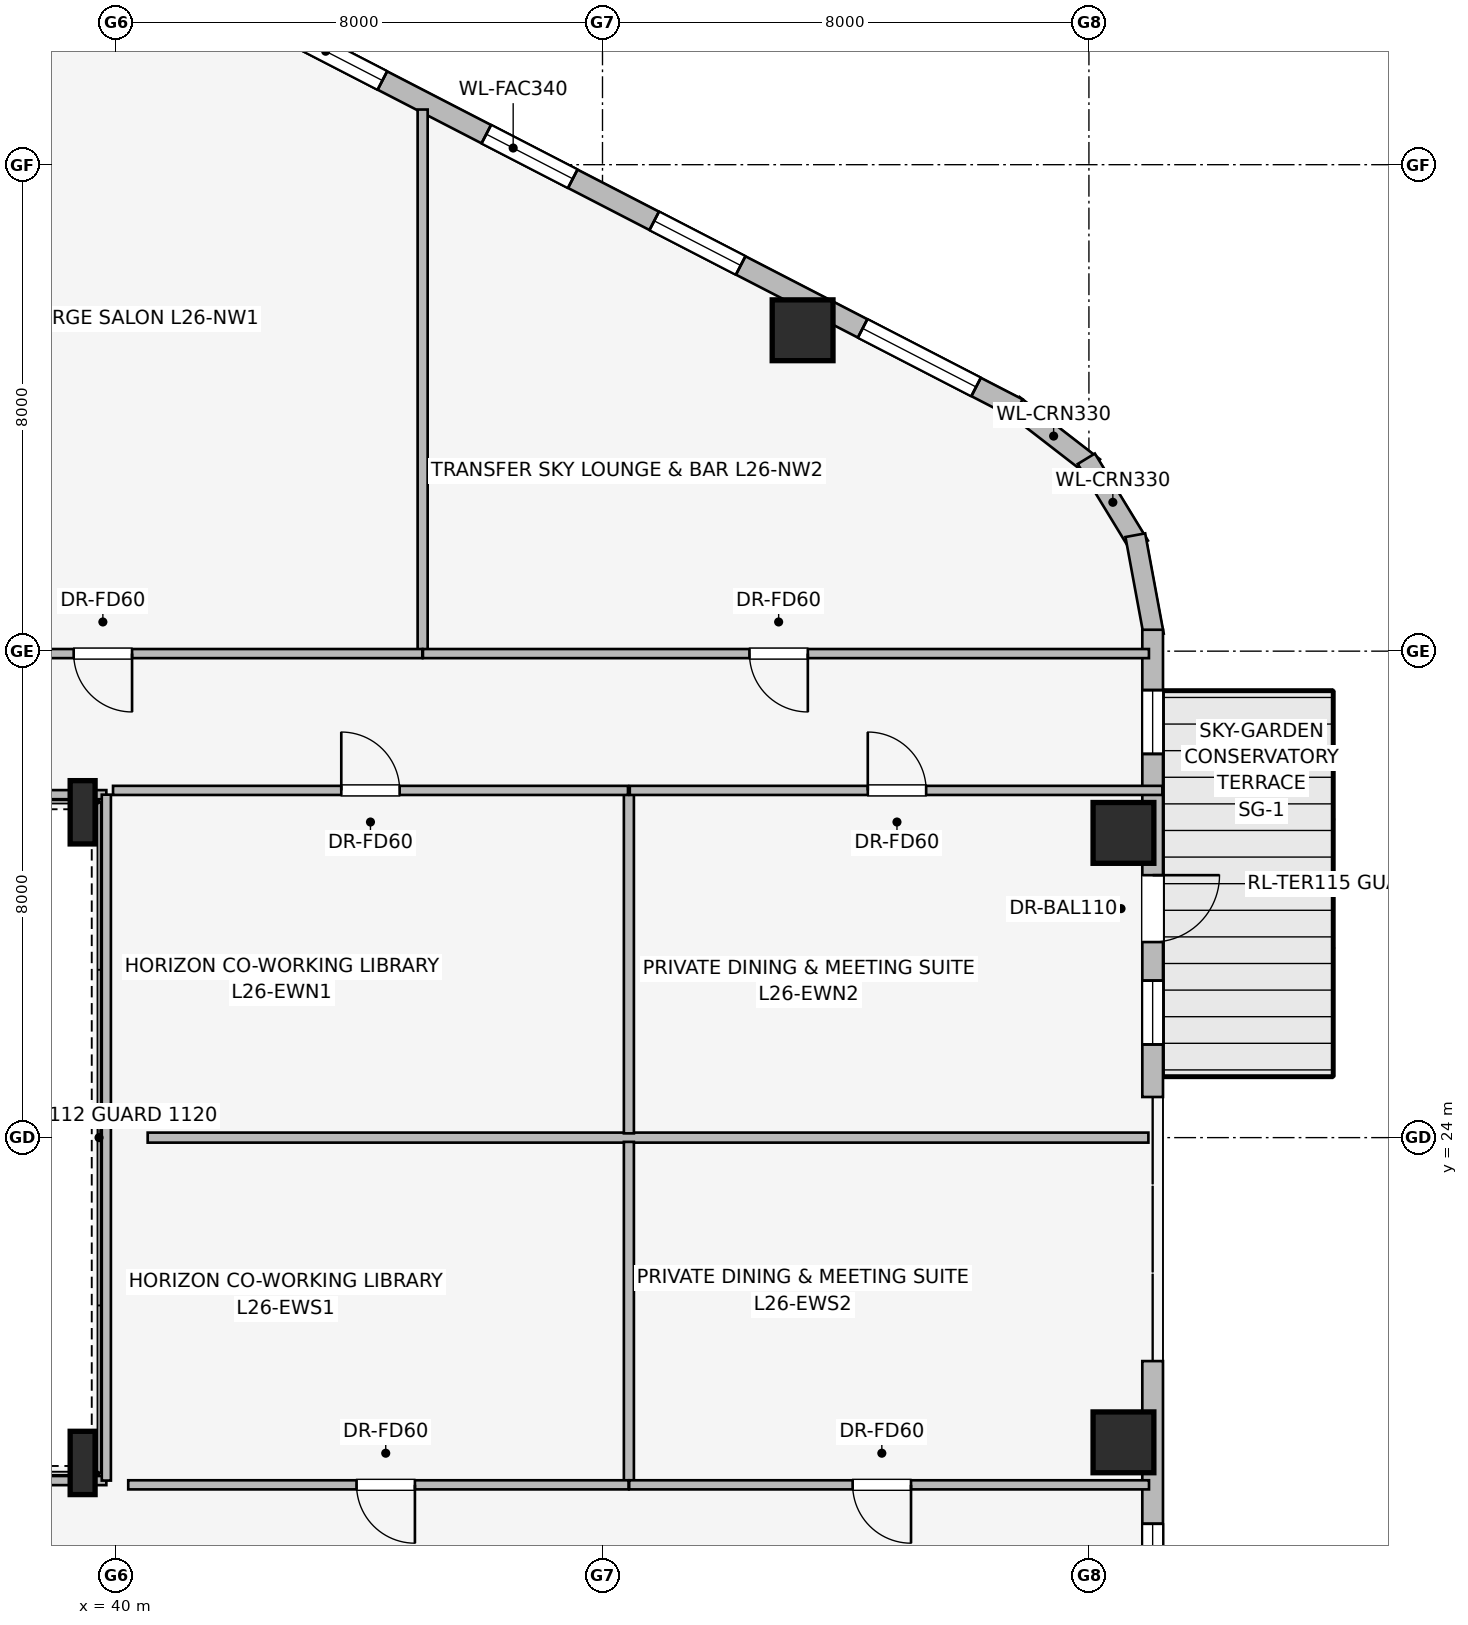
"""IFC4 building model, lengths in metres.
Left out: names, types, materials, properties, quantities, classifications, styles, units other than length and angle.
Written with IfcOpenShell. Run it as: python <this file> out.ifc"""

import sys

from ifc_helpers import new_model, si_unit, direction, frame, frame_2d, origin, origin_2d, place, context, subcontext, project, spatial, rectangle, i_section, extrude, element, fill, save


model = new_model("IFC4")
c1 = context("Model", 3, precision=1e-05, world=origin(), true_north=direction((0.0, 1.0)))
c2 = subcontext(c1, "Body", "Model", "MODEL_VIEW")
j1 = project(units=[si_unit("LENGTHUNIT", "METRE"), si_unit("PLANEANGLEUNIT", "RADIAN")], contexts=[c1])
p1 = place(None, origin())
s1 = spatial("IfcSite", under=j1, at=p1, CompositionType="ELEMENT")
p2 = place(p1, origin())
s2 = spatial("IfcBuilding", under=s1, at=p2, CompositionType="ELEMENT")
p3 = place(p2, frame((0.0, 0.0, 101.55)))
s3 = spatial("IfcBuildingStorey", under=s2, at=p3, CompositionType="ELEMENT", Elevation=101.55)
for number, where, z_axis, x_axis in (
    (1, (51.291, 37.277, 0.0), (0.0, 0.0, 1.0), (1.0, 0.0, 0.0)),
    (2, (56.568, 18.989, 0.0), (0.0, 0.0, 1.0), (1.0, 0.0, 0.0)),
    (3, (56.568, 29.011, 0.0), (0.0, 0.0, 1.0), (1.0, 0.0, 0.0)),
):
    element("IfcColumn", number, at=place(p3, frame(where, z_axis=z_axis, x_axis=x_axis)), inside=s3, PredefinedType="COLUMN", context=c2, shape_type="SweptSolid", body=[
        extrude(rectangle(XDim=1.0, YDim=1.0, at=origin_2d()), origin(), (0.0, 0.0, 1.0), 3.45),
    ])
for number, where, z_axis, x_axis in (
    (4, (39.45, 18.65, 0.0), (0.0, 0.0, 1.0), (1.0, 0.0, 0.0)),
    (5, (39.45, 29.35, 0.0), (0.0, 0.0, 1.0), (1.0, 0.0, 0.0)),
):
    element("IfcColumn", number, at=place(p3, frame(where, z_axis=z_axis, x_axis=x_axis)), inside=s3, PredefinedType="COLUMN", context=c2, shape_type="SweptSolid", body=[
        extrude(i_section(OverallWidth=0.41, OverallDepth=1.041, WebThickness=0.031, FlangeThickness=0.056, at=origin_2d()), origin(), (0.0, 0.0, 1.0), 3.45),
    ])
p4 = place(p3, frame((54.757, 36.05, 0.0), z_axis=(0.0, 0.0, 1.0), x_axis=(0.790621329885, -0.612305408053, 0.0)))
e6 = element("IfcWall", 6, at=p4, inside=s3, PredefinedType="STANDARD", context=c2, shape_type="SweptSolid", body=[
    extrude(rectangle(XDim=1.676, YDim=0.33, at=frame_2d((0.838, 0.0))), origin(), (0.0, 0.0, 1.0), 3.19),
])
p5 = place(p3, frame((55.957, 35.164, 0.0), z_axis=(0.0, 0.0, 1.0), x_axis=(0.520519429557, -0.853849824883, 0.0)))
e7 = element("IfcWall", 7, at=p5, inside=s3, PredefinedType="STANDARD", context=c2, shape_type="SweptSolid", body=[
    extrude(rectangle(XDim=1.677, YDim=0.33, at=frame_2d((0.839, 0.0))), origin(), (0.0, 0.0, 1.0), 3.19),
])
p6 = place(p3, frame((56.763, 33.907, 0.0), z_axis=(0.0, 0.0, 1.0), x_axis=(0.181984991895, -0.983301308209, 0.0)))
e8 = element("IfcWall", 8, at=p6, inside=s3, PredefinedType="STANDARD", context=c2, shape_type="SweptSolid", body=[
    extrude(rectangle(XDim=1.677, YDim=0.33, at=frame_2d((0.838, 0.0))), origin(), (0.0, 0.0, 1.0), 3.19),
])
p7 = place(p3, frame((38.231, 44.558, 0.0), z_axis=(0.0, 0.0, 1.0), x_axis=(0.888613612362, -0.458656568606, 0.0)))
e9 = element("IfcWall", 9, at=p7, inside=s3, PredefinedType="STANDARD", context=c2, shape_type="SweptSolid", body=[
    extrude(rectangle(XDim=18.681, YDim=0.34, at=frame_2d((9.34, 0.0))), origin(), (0.0, 0.0, 1.0), 3.19),
])
p8 = place(p7, frame((1.023, 0.0, 0.75)))
e10 = element("IfcOpeningElement", 10, at=p8, cuts=e9, PredefinedType="OPENING", context=c2, shape_type="SweptSolid", body=[
    extrude(rectangle(XDim=1.6, YDim=1.55, at=frame_2d((0.8, 0.775))), frame((0.0, 0.18, 0.0), z_axis=(0.0, -1.0, 0.0), x_axis=(1.0, 0.0, 0.0)), (0.0, 0.0, 1.0), 0.36),
])
p9 = place(p7, frame((4.82, 0.0, 0.75)))
e11 = element("IfcOpeningElement", 11, at=p9, cuts=e9, PredefinedType="OPENING", context=c2, shape_type="SweptSolid", body=[
    extrude(rectangle(XDim=2.1, YDim=1.5, at=frame_2d((1.05, 0.75))), frame((0.0, 0.18, 0.0), z_axis=(0.0, -1.0, 0.0), x_axis=(1.0, 0.0, 0.0)), (0.0, 0.0, 1.0), 0.36),
])
p10 = place(p7, frame((8.843, 0.0, 0.75)))
e12 = element("IfcOpeningElement", 12, at=p10, cuts=e9, PredefinedType="OPENING", context=c2, shape_type="SweptSolid", body=[
    extrude(rectangle(XDim=1.6, YDim=1.55, at=frame_2d((0.8, 0.775))), frame((0.0, 0.18, 0.0), z_axis=(0.0, -1.0, 0.0), x_axis=(1.0, 0.0, 0.0)), (0.0, 0.0, 1.0), 0.36),
])
p11 = place(p7, frame((11.951, 0.0, 0.75)))
e13 = element("IfcOpeningElement", 13, at=p11, cuts=e9, PredefinedType="OPENING", context=c2, shape_type="SweptSolid", body=[
    extrude(rectangle(XDim=1.6, YDim=1.55, at=frame_2d((0.8, 0.775))), frame((0.0, 0.18, 0.0), z_axis=(0.0, -1.0, 0.0), x_axis=(1.0, 0.0, 0.0)), (0.0, 0.0, 1.0), 0.36),
])
p12 = place(p7, frame((15.808, 0.0, 0.75)))
e14 = element("IfcOpeningElement", 14, at=p12, cuts=e9, PredefinedType="OPENING", context=c2, shape_type="SweptSolid", body=[
    extrude(rectangle(XDim=2.1, YDim=1.5, at=frame_2d((1.05, 0.75))), frame((0.0, 0.18, 0.0), z_axis=(0.0, -1.0, 0.0), x_axis=(1.0, 0.0, 0.0)), (0.0, 0.0, 1.0), 0.36),
])
p13 = place(p3, frame((57.048, 32.352, 0.0), z_axis=(0.0, 0.0, 1.0), x_axis=(0.0, -1.0, 0.0)))
e15 = element("IfcWall", 15, at=p13, inside=s3, PredefinedType="STANDARD", context=c2, shape_type="SweptSolid", body=[
    extrude(rectangle(XDim=7.684, YDim=0.34, at=frame_2d((3.842, 0.0))), origin(), (0.0, 0.0, 1.0), 3.19),
])
p14 = place(p13, frame((4.036, 0.0, 0.0)))
e16 = element("IfcOpeningElement", 16, at=p14, cuts=e15, PredefinedType="OPENING", context=c2, shape_type="SweptSolid", body=[
    extrude(rectangle(XDim=1.1, YDim=2.04, at=frame_2d((0.55, 1.02))), frame((0.0, 0.18, 0.0), z_axis=(0.0, -1.0, 0.0), x_axis=(1.0, 0.0, 0.0)), (0.0, 0.0, 1.0), 0.36),
])
p15 = place(p13, frame((0.992, 0.0, 0.75)))
e17 = element("IfcOpeningElement", 17, at=p15, cuts=e15, PredefinedType="OPENING", context=c2, shape_type="SweptSolid", body=[
    extrude(rectangle(XDim=1.05, YDim=1.4, at=frame_2d((0.525, 0.7))), frame((0.0, 0.18, 0.0), z_axis=(0.0, -1.0, 0.0), x_axis=(1.0, 0.0, 0.0)), (0.0, 0.0, 1.0), 0.36),
])
p16 = place(p13, frame((5.77, 0.0, 0.75)))
e18 = element("IfcOpeningElement", 18, at=p16, cuts=e15, PredefinedType="OPENING", context=c2, shape_type="SweptSolid", body=[
    extrude(rectangle(XDim=1.05, YDim=1.4, at=frame_2d((0.525, 0.7))), frame((0.0, 0.18, 0.0), z_axis=(0.0, -1.0, 0.0), x_axis=(1.0, 0.0, 0.0)), (0.0, 0.0, 1.0), 0.36),
])
p17 = place(p3, frame((57.048, 20.325, 0.0), z_axis=(0.0, 0.0, 1.0), x_axis=(0.0, -1.0, 0.0)))
e19 = element("IfcWall", 19, at=p17, inside=s3, PredefinedType="STANDARD", context=c2, shape_type="SweptSolid", body=[
    extrude(rectangle(XDim=4.677, YDim=0.34, at=frame_2d((2.338, 0.0))), origin(), (0.0, 0.0, 1.0), 3.19),
])
p18 = place(p17, frame((2.675, 0.0, 0.75)))
e20 = element("IfcOpeningElement", 20, at=p18, cuts=e19, PredefinedType="OPENING", context=c2, shape_type="SweptSolid", body=[
    extrude(rectangle(XDim=1.05, YDim=1.4, at=frame_2d((0.525, 0.7))), frame((0.0, 0.18, 0.0), z_axis=(0.0, -1.0, 0.0), x_axis=(1.0, 0.0, 0.0)), (0.0, 0.0, 1.0), 0.36),
])
p19 = place(p3, frame((27.55, 18.36, 0.0), z_axis=(0.0, 0.0, 1.0), x_axis=(1.0, 0.0, 0.0)))
e21 = element("IfcWall", 21, at=p19, inside=s3, PredefinedType="PARTITIONING", context=c2, shape_type="SweptSolid", body=[
    extrude(rectangle(XDim=12.29, YDim=0.15, at=frame_2d((6.145, 0.0))), origin(), (0.0, 0.0, 1.0), 2.331),
])
p20 = place(p3, frame((39.84, 29.64, 0.0), z_axis=(0.0, 0.0, 1.0), x_axis=(-1.0, 0.0, 0.0)))
e22 = element("IfcWall", 22, at=p20, inside=s3, PredefinedType="PARTITIONING", context=c2, shape_type="SweptSolid", body=[
    extrude(rectangle(XDim=12.2, YDim=0.15, at=frame_2d((6.1, 0.0))), origin(), (0.0, 0.0, 1.0), 2.331),
])
p21 = place(p3, frame((39.84, 18.36, 0.0), z_axis=(0.0, 0.0, 1.0), x_axis=(0.0, 1.0, 0.0)))
e23 = element("IfcWall", 23, at=p21, inside=s3, PredefinedType="PARTITIONING", context=c2, shape_type="SweptSolid", body=[
    extrude(rectangle(XDim=11.28, YDim=0.15, at=frame_2d((5.64, 0.0))), origin(), (0.0, 0.0, 1.0), 3.19),
])
p22 = place(p3, frame((45.042, 31.97, 0.0), z_axis=(0.0, 0.0, 1.0), x_axis=(0.0, 1.0, 0.0)))
e24 = element("IfcWall", 24, at=p22, inside=s3, PredefinedType="PARTITIONING", context=c2, shape_type="SweptSolid", body=[
    extrude(rectangle(XDim=8.937, YDim=0.165, at=frame_2d((4.469, 0.0))), origin(), (0.0, 0.0, 1.0), 3.19),
])
p23 = place(p3, frame((45.037, 31.96, 0.0), z_axis=(0.0, 0.0, 1.0), x_axis=(-1.0, 0.0, 0.0)))
e25 = element("IfcWall", 25, at=p23, inside=s3, PredefinedType="PARTITIONING", context=c2, shape_type="SweptSolid", body=[
    extrude(rectangle(XDim=10.747, YDim=0.15, at=frame_2d((5.374, 0.0))), origin(), (0.0, 0.0, 1.0), 3.19),
])
p24 = place(p23, frame((4.774, 0.0, 0.0)))
e26 = element("IfcOpeningElement", 26, at=p24, cuts=e25, PredefinedType="OPENING", context=c2, shape_type="SweptSolid", body=[
    extrude(rectangle(XDim=0.96, YDim=2.0, at=frame_2d((0.48, 1.0))), frame((0.0, 0.085, 0.0), z_axis=(0.0, -1.0, 0.0), x_axis=(1.0, 0.0, 0.0)), (0.0, 0.0, 1.0), 0.17),
])
p25 = place(p3, frame((56.987, 31.96, 0.0), z_axis=(0.0, 0.0, 1.0), x_axis=(-1.0, 0.0, 0.0)))
e27 = element("IfcWall", 27, at=p25, inside=s3, PredefinedType="PARTITIONING", context=c2, shape_type="SweptSolid", body=[
    extrude(rectangle(XDim=11.94, YDim=0.15, at=frame_2d((5.97, 0.0))), origin(), (0.0, 0.0, 1.0), 3.19),
])
p26 = place(p25, frame((5.61, 0.0, 0.0)))
e28 = element("IfcOpeningElement", 28, at=p26, cuts=e27, PredefinedType="OPENING", context=c2, shape_type="SweptSolid", body=[
    extrude(rectangle(XDim=0.96, YDim=2.0, at=frame_2d((0.48, 1.0))), frame((0.0, 0.085, 0.0), z_axis=(0.0, -1.0, 0.0), x_axis=(1.0, 0.0, 0.0)), (0.0, 0.0, 1.0), 0.17),
])
p27 = place(p3, frame((40.52, 24.0, 0.0), z_axis=(0.0, 0.0, 1.0), x_axis=(1.0, 0.0, 0.0)))
e29 = element("IfcWall", 29, at=p27, inside=s3, PredefinedType="PARTITIONING", context=c2, shape_type="SweptSolid", body=[
    extrude(rectangle(XDim=16.458, YDim=0.165, at=frame_2d((8.229, 0.0))), origin(), (0.0, 0.0, 1.0), 3.19),
])
p28 = place(p3, frame((48.434, 24.07, 0.0), z_axis=(0.0, 0.0, 1.0), x_axis=(0.0, 1.0, 0.0)))
e30 = element("IfcWall", 30, at=p28, inside=s3, PredefinedType="PARTITIONING", context=c2, shape_type="SweptSolid", body=[
    extrude(rectangle(XDim=5.64, YDim=0.165, at=frame_2d((2.82, 0.0))), origin(), (0.0, 0.0, 1.0), 2.733),
])
p29 = place(p3, frame((39.95, 29.71, 0.0), z_axis=(0.0, 0.0, 1.0), x_axis=(1.0, 0.0, 0.0)))
e31 = element("IfcWall", 31, at=p29, inside=s3, PredefinedType="PARTITIONING", context=c2, shape_type="SweptSolid", body=[
    extrude(rectangle(XDim=8.469, YDim=0.15, at=frame_2d((4.234, 0.0))), origin(), (0.0, 0.0, 1.0), 3.19),
])
p30 = place(p29, frame((3.754, 0.0, 0.0)))
e32 = element("IfcOpeningElement", 32, at=p30, cuts=e31, PredefinedType="OPENING", context=c2, shape_type="SweptSolid", body=[
    extrude(rectangle(XDim=0.96, YDim=2.0, at=frame_2d((0.48, 1.0))), frame((0.0, 0.085, 0.0), z_axis=(0.0, -1.0, 0.0), x_axis=(1.0, 0.0, 0.0)), (0.0, 0.0, 1.0), 0.17),
])
p31 = place(p3, frame((48.449, 29.71, 0.0), z_axis=(0.0, 0.0, 1.0), x_axis=(1.0, 0.0, 0.0)))
e33 = element("IfcWall", 33, at=p31, inside=s3, PredefinedType="PARTITIONING", context=c2, shape_type="SweptSolid", body=[
    extrude(rectangle(XDim=8.759, YDim=0.15, at=frame_2d((4.379, 0.0))), origin(), (0.0, 0.0, 1.0), 3.19),
])
p32 = place(p31, frame((3.914, 0.0, 0.0)))
e34 = element("IfcOpeningElement", 34, at=p32, cuts=e33, PredefinedType="OPENING", context=c2, shape_type="SweptSolid", body=[
    extrude(rectangle(XDim=0.96, YDim=2.0, at=frame_2d((0.48, 1.0))), frame((0.0, 0.085, 0.0), z_axis=(0.0, -1.0, 0.0), x_axis=(1.0, 0.0, 0.0)), (0.0, 0.0, 1.0), 0.17),
])
p33 = place(p3, frame((48.434, 18.29, 0.0), z_axis=(0.0, 0.0, 1.0), x_axis=(0.0, 1.0, 0.0)))
e35 = element("IfcWall", 35, at=p33, inside=s3, PredefinedType="PARTITIONING", context=c2, shape_type="SweptSolid", body=[
    extrude(rectangle(XDim=5.64, YDim=0.165, at=frame_2d((2.82, 0.0))), origin(), (0.0, 0.0, 1.0), 2.733),
])
p34 = place(p3, frame((48.429, 18.29, 0.0), z_axis=(0.0, 0.0, 1.0), x_axis=(-1.0, 0.0, 0.0)))
e36 = element("IfcWall", 36, at=p34, inside=s3, PredefinedType="PARTITIONING", context=c2, shape_type="SweptSolid", body=[
    extrude(rectangle(XDim=8.229, YDim=0.15, at=frame_2d((4.115, 0.0))), origin(), (0.0, 0.0, 1.0), 3.19),
])
p35 = place(p34, frame((3.514, 0.0, 0.0)))
e37 = element("IfcOpeningElement", 37, at=p35, cuts=e36, PredefinedType="OPENING", context=c2, shape_type="SweptSolid", body=[
    extrude(rectangle(XDim=0.96, YDim=2.0, at=frame_2d((0.48, 1.0))), frame((0.0, 0.085, 0.0), z_axis=(0.0, -1.0, 0.0), x_axis=(1.0, 0.0, 0.0)), (0.0, 0.0, 1.0), 0.17),
])
p36 = place(p3, frame((56.988, 18.29, 0.0), z_axis=(0.0, 0.0, 1.0), x_axis=(-1.0, 0.0, 0.0)))
e38 = element("IfcWall", 38, at=p36, inside=s3, PredefinedType="PARTITIONING", context=c2, shape_type="SweptSolid", body=[
    extrude(rectangle(XDim=8.549, YDim=0.15, at=frame_2d((4.274, 0.0))), origin(), (0.0, 0.0, 1.0), 3.19),
])
p37 = place(p36, frame((3.914, 0.0, 0.0)))
e39 = element("IfcOpeningElement", 39, at=p37, cuts=e38, PredefinedType="OPENING", context=c2, shape_type="SweptSolid", body=[
    extrude(rectangle(XDim=0.96, YDim=2.0, at=frame_2d((0.48, 1.0))), frame((0.0, 0.085, 0.0), z_axis=(0.0, -1.0, 0.0), x_axis=(1.0, 0.0, 0.0)), (0.0, 0.0, 1.0), 0.17),
])
p38 = place(p9, origin())
e40 = element("IfcWindow", 40, at=p38, inside=s3, PartitioningType="SINGLE_PANEL", PredefinedType="WINDOW", context=c2, shape_type="SweptSolid", body=[
    extrude(rectangle(XDim=2.1, YDim=1.5, at=frame_2d((1.05, 0.75))), frame((0.0, 0.03, 0.0), z_axis=(0.0, -1.0, 0.0), x_axis=(1.0, 0.0, 0.0)), (0.0, 0.0, 1.0), 0.06),
])
fill(e11, e40)
p39 = place(p10, origin())
e41 = element("IfcWindow", 41, at=p39, inside=s3, PartitioningType="SINGLE_PANEL", PredefinedType="WINDOW", context=c2, shape_type="SweptSolid", body=[
    extrude(rectangle(XDim=1.6, YDim=1.55, at=frame_2d((0.8, 0.775))), frame((0.0, 0.03, 0.0), z_axis=(0.0, -1.0, 0.0), x_axis=(1.0, 0.0, 0.0)), (0.0, 0.0, 1.0), 0.06),
])
fill(e12, e41)
p40 = place(p11, origin())
e42 = element("IfcWindow", 42, at=p40, inside=s3, PartitioningType="SINGLE_PANEL", PredefinedType="WINDOW", context=c2, shape_type="SweptSolid", body=[
    extrude(rectangle(XDim=1.6, YDim=1.55, at=frame_2d((0.8, 0.775))), frame((0.0, 0.03, 0.0), z_axis=(0.0, -1.0, 0.0), x_axis=(1.0, 0.0, 0.0)), (0.0, 0.0, 1.0), 0.06),
])
fill(e13, e42)
p41 = place(p12, origin())
e43 = element("IfcWindow", 43, at=p41, inside=s3, PartitioningType="SINGLE_PANEL", PredefinedType="WINDOW", context=c2, shape_type="SweptSolid", body=[
    extrude(rectangle(XDim=2.1, YDim=1.5, at=frame_2d((1.05, 0.75))), frame((0.0, 0.03, 0.0), z_axis=(0.0, -1.0, 0.0), x_axis=(1.0, 0.0, 0.0)), (0.0, 0.0, 1.0), 0.06),
])
fill(e14, e43)
p42 = place(p14, origin())
e44 = element("IfcDoor", 44, at=p42, inside=s3, OperationType="SINGLE_SWING_LEFT", PredefinedType="DOOR", context=c2, shape_type="SweptSolid", body=[
    extrude(rectangle(XDim=1.1, YDim=2.04, at=frame_2d((0.55, 1.02))), frame((0.0, 0.025, 0.0), z_axis=(0.0, -1.0, 0.0), x_axis=(1.0, 0.0, 0.0)), (0.0, 0.0, 1.0), 0.05),
])
fill(e16, e44)
p43 = place(p15, origin())
e45 = element("IfcWindow", 45, at=p43, inside=s3, PartitioningType="SINGLE_PANEL", PredefinedType="WINDOW", context=c2, shape_type="SweptSolid", body=[
    extrude(rectangle(XDim=1.05, YDim=1.4, at=frame_2d((0.525, 0.7))), frame((0.0, 0.03, 0.0), z_axis=(0.0, -1.0, 0.0), x_axis=(1.0, 0.0, 0.0)), (0.0, 0.0, 1.0), 0.06),
])
fill(e17, e45)
p44 = place(p16, origin())
e46 = element("IfcWindow", 46, at=p44, inside=s3, PartitioningType="SINGLE_PANEL", PredefinedType="WINDOW", context=c2, shape_type="SweptSolid", body=[
    extrude(rectangle(XDim=1.05, YDim=1.4, at=frame_2d((0.525, 0.7))), frame((0.0, 0.03, 0.0), z_axis=(0.0, -1.0, 0.0), x_axis=(1.0, 0.0, 0.0)), (0.0, 0.0, 1.0), 0.06),
])
fill(e18, e46)
p45 = place(p18, origin())
e47 = element("IfcWindow", 47, at=p45, inside=s3, PartitioningType="SINGLE_PANEL", PredefinedType="WINDOW", context=c2, shape_type="SweptSolid", body=[
    extrude(rectangle(XDim=1.05, YDim=1.4, at=frame_2d((0.525, 0.7))), frame((0.0, 0.03, 0.0), z_axis=(0.0, -1.0, 0.0), x_axis=(1.0, 0.0, 0.0)), (0.0, 0.0, 1.0), 0.06),
])
fill(e20, e47)
p46 = place(p24, origin())
e48 = element("IfcDoor", 48, at=p46, inside=s3, OperationType="SINGLE_SWING_LEFT", PredefinedType="DOOR", context=c2, shape_type="SweptSolid", body=[
    extrude(rectangle(XDim=0.96, YDim=2.0, at=frame_2d((0.48, 1.0))), frame((0.0, 0.025, 0.0), z_axis=(0.0, -1.0, 0.0), x_axis=(1.0, 0.0, 0.0)), (0.0, 0.0, 1.0), 0.05),
])
fill(e26, e48)
p47 = place(p26, origin())
e49 = element("IfcDoor", 49, at=p47, inside=s3, OperationType="SINGLE_SWING_LEFT", PredefinedType="DOOR", context=c2, shape_type="SweptSolid", body=[
    extrude(rectangle(XDim=0.96, YDim=2.0, at=frame_2d((0.48, 1.0))), frame((0.0, 0.025, 0.0), z_axis=(0.0, -1.0, 0.0), x_axis=(1.0, 0.0, 0.0)), (0.0, 0.0, 1.0), 0.05),
])
fill(e28, e49)
p48 = place(p30, origin())
e50 = element("IfcDoor", 50, at=p48, inside=s3, OperationType="SINGLE_SWING_LEFT", PredefinedType="DOOR", context=c2, shape_type="SweptSolid", body=[
    extrude(rectangle(XDim=0.96, YDim=2.0, at=frame_2d((0.48, 1.0))), frame((0.0, 0.025, 0.0), z_axis=(0.0, -1.0, 0.0), x_axis=(1.0, 0.0, 0.0)), (0.0, 0.0, 1.0), 0.05),
])
fill(e32, e50)
p49 = place(p32, origin())
e51 = element("IfcDoor", 51, at=p49, inside=s3, OperationType="SINGLE_SWING_LEFT", PredefinedType="DOOR", context=c2, shape_type="SweptSolid", body=[
    extrude(rectangle(XDim=0.96, YDim=2.0, at=frame_2d((0.48, 1.0))), frame((0.0, 0.025, 0.0), z_axis=(0.0, -1.0, 0.0), x_axis=(1.0, 0.0, 0.0)), (0.0, 0.0, 1.0), 0.05),
])
fill(e34, e51)
p50 = place(p35, origin())
e52 = element("IfcDoor", 52, at=p50, inside=s3, OperationType="SINGLE_SWING_LEFT", PredefinedType="DOOR", context=c2, shape_type="SweptSolid", body=[
    extrude(rectangle(XDim=0.96, YDim=2.0, at=frame_2d((0.48, 1.0))), frame((0.0, 0.025, 0.0), z_axis=(0.0, -1.0, 0.0), x_axis=(1.0, 0.0, 0.0)), (0.0, 0.0, 1.0), 0.05),
])
fill(e37, e52)
p51 = place(p37, origin())
e53 = element("IfcDoor", 53, at=p51, inside=s3, OperationType="SINGLE_SWING_LEFT", PredefinedType="DOOR", context=c2, shape_type="SweptSolid", body=[
    extrude(rectangle(XDim=0.96, YDim=2.0, at=frame_2d((0.48, 1.0))), frame((0.0, 0.025, 0.0), z_axis=(0.0, -1.0, 0.0), x_axis=(1.0, 0.0, 0.0)), (0.0, 0.0, 1.0), 0.05),
])
fill(e39, e53)
save(model, sys.argv[1])
